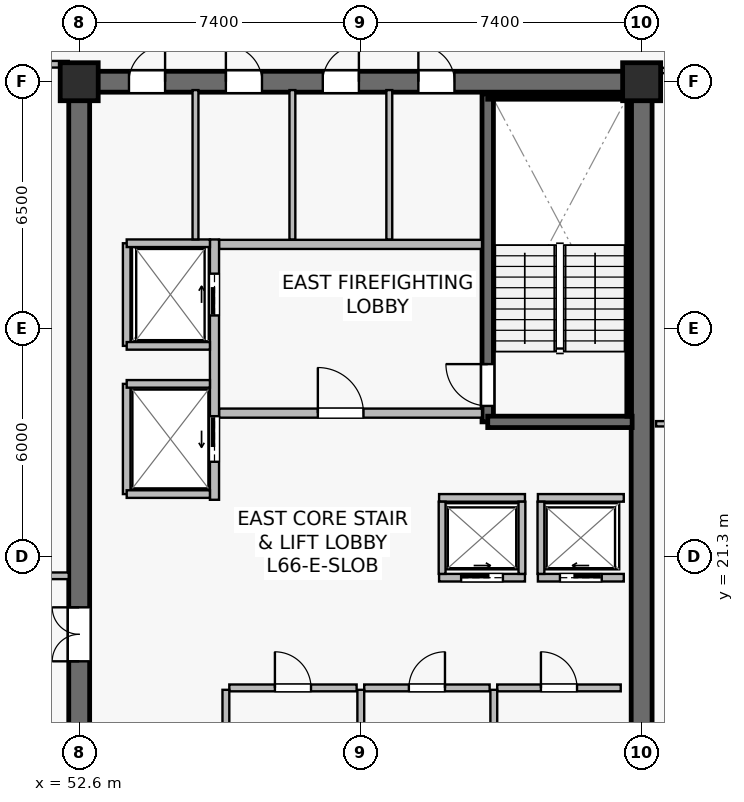
"""IFC4 building model, lengths in metres.
Left out: names, types, materials, properties, quantities, classifications, styles, units other than length and angle.
Written with IfcOpenShell. Run it as: python <this file> out.ifc"""

import sys

from ifc_helpers import new_model, si_unit, direction, frame, frame_2d, origin, origin_2d, place, context, subcontext, project, spatial, rectangle, extrude, source, transform, mapped, element, fill, save


model = new_model("IFC4")
c1 = context("Model", 3, precision=1e-05, world=origin(), true_north=direction((0.0, 1.0)))
c2 = subcontext(c1, "Body", "Model", "MODEL_VIEW")
j1 = project(units=[si_unit("LENGTHUNIT", "METRE"), si_unit("PLANEANGLEUNIT", "RADIAN")], contexts=[c1])
p1 = place(None, origin())
s1 = spatial("IfcSite", under=j1, at=p1, CompositionType="ELEMENT")
p2 = place(p1, origin())
s2 = spatial("IfcBuilding", under=s1, at=p2, CompositionType="ELEMENT")
p3 = place(p2, frame((0.0, 0.0, 275.2)))
s3 = spatial("IfcBuildingStorey", under=s2, at=p3, CompositionType="ELEMENT", Elevation=275.2)
p4 = place(p3, frame((52.325, 33.8, 0.0), z_axis=(0.0, 0.0, 1.0), x_axis=(1.0, 0.0, 0.0)))
e1 = element("IfcWall", 1, at=p4, inside=s3, PredefinedType="SHEAR", context=c2, shape_type="SweptSolid", body=[
    extrude(rectangle(XDim=15.35, YDim=0.55, at=frame_2d((7.675, 0.0))), origin(), (0.0, 0.0, 1.0), 3.8),
])
p5 = place(p4, frame((9.2, 0.0, 0.0)))
e2 = element("IfcOpeningElement", 2, at=p5, cuts=e1, PredefinedType="OPENING", context=c2, shape_type="SweptSolid", body=[
    extrude(rectangle(XDim=0.95, YDim=2.15, at=frame_2d((0.475, 1.075))), frame((0.0, 0.285, 0.0), z_axis=(0.0, -1.0, 0.0), x_axis=(1.0, 0.0, 0.0)), (0.0, 0.0, 1.0), 0.57),
])
p6 = place(p4, frame((6.685, 0.0, 0.0)))
e3 = element("IfcOpeningElement", 3, at=p6, cuts=e1, PredefinedType="OPENING", context=c2, shape_type="SweptSolid", body=[
    extrude(rectangle(XDim=0.95, YDim=2.15, at=frame_2d((0.475, 1.075))), frame((0.0, 0.285, 0.0), z_axis=(0.0, -1.0, 0.0), x_axis=(1.0, 0.0, 0.0)), (0.0, 0.0, 1.0), 0.57),
])
p7 = place(p4, frame((4.135, 0.0, 0.0)))
e4 = element("IfcOpeningElement", 4, at=p7, cuts=e1, PredefinedType="OPENING", context=c2, shape_type="SweptSolid", body=[
    extrude(rectangle(XDim=0.95, YDim=2.15, at=frame_2d((0.475, 1.075))), frame((0.0, 0.285, 0.0), z_axis=(0.0, -1.0, 0.0), x_axis=(1.0, 0.0, 0.0)), (0.0, 0.0, 1.0), 0.57),
])
p8 = place(p4, frame((1.585, 0.0, 0.0)))
e5 = element("IfcOpeningElement", 5, at=p8, cuts=e1, PredefinedType="OPENING", context=c2, shape_type="SweptSolid", body=[
    extrude(rectangle(XDim=0.95, YDim=2.15, at=frame_2d((0.475, 1.075))), frame((0.0, 0.285, 0.0), z_axis=(0.0, -1.0, 0.0), x_axis=(1.0, 0.0, 0.0)), (0.0, 0.0, 1.0), 0.57),
])
p9 = place(p3, frame((52.6, 15.075, 0.0), z_axis=(0.0, 0.0, 1.0), x_axis=(0.0, 1.0, 0.0)))
e6 = element("IfcWall", 6, at=p9, inside=s3, PredefinedType="SHEAR", context=c2, shape_type="SweptSolid", body=[
    extrude(rectangle(XDim=18.45, YDim=0.55, at=frame_2d((9.225, 0.0))), origin(), (0.0, 0.0, 1.0), 3.8),
])
p10 = place(p9, frame((3.475, 0.0, 0.0)))
e7 = element("IfcOpeningElement", 7, at=p10, cuts=e6, PredefinedType="OPENING", context=c2, shape_type="SweptSolid", body=[
    extrude(rectangle(XDim=1.42, YDim=2.2, at=frame_2d((0.71, 1.1))), frame((0.0, 0.285, 0.0), z_axis=(0.0, -1.0, 0.0), x_axis=(1.0, 0.0, 0.0)), (0.0, 0.0, 1.0), 0.57),
])
p11 = place(p3, frame((67.4, 15.075, 0.0), z_axis=(0.0, 0.0, 1.0), x_axis=(0.0, 1.0, 0.0)))
e8 = element("IfcWall", 8, at=p11, inside=s3, PredefinedType="SHEAR", context=c2, shape_type="SweptSolid", body=[
    extrude(rectangle(XDim=18.45, YDim=0.55, at=frame_2d((9.225, 0.0))), origin(), (0.0, 0.0, 1.0), 3.8),
])
p12 = place(p3, frame((63.35, 24.85, 0.0), z_axis=(0.0, 0.0, 1.0), x_axis=(0.0, 1.0, 0.0)))
e9 = element("IfcWall", 9, at=p12, inside=s3, PredefinedType="SHEAR", context=c2, shape_type="SweptSolid", body=[
    extrude(rectangle(XDim=8.63, YDim=0.3, at=frame_2d((4.315, 0.0))), origin(), (0.0, 0.0, 1.0), 3.8),
])
p13 = place(p12, frame((0.42, 0.0, 0.0)))
e10 = element("IfcOpeningElement", 10, at=p13, cuts=e9, PredefinedType="OPENING", context=c2, shape_type="SweptSolid", body=[
    extrude(rectangle(XDim=1.1, YDim=2.15, at=frame_2d((0.55, 1.075))), frame((0.0, 0.16, 0.0), z_axis=(0.0, -1.0, 0.0), x_axis=(1.0, 0.0, 0.0)), (0.0, 0.0, 1.0), 0.32),
])
p14 = place(p3, frame((63.35, 24.85, 0.0), z_axis=(0.0, 0.0, 1.0), x_axis=(1.0, 0.0, 0.0)))
e11 = element("IfcWall", 11, at=p14, inside=s3, PredefinedType="SHEAR", context=c2, shape_type="SweptSolid", body=[
    extrude(rectangle(XDim=3.8, YDim=0.3, at=frame_2d((1.9, 0.0))), origin(), (0.0, 0.0, 1.0), 3.8),
])
p15 = place(p3, frame((63.35, 33.4, 0.0), z_axis=(0.0, 0.0, 1.0), x_axis=(1.0, 0.0, 0.0)))
e12 = element("IfcWall", 12, at=p15, inside=s3, PredefinedType="SOLIDWALL", context=c2, shape_type="SweptSolid", body=[
    extrude(rectangle(XDim=3.72, YDim=0.12, at=frame_2d((1.86, 0.0))), origin(), (0.0, 0.0, 1.0), 3.8),
])
p16 = place(p3, frame((67.07, 25.0, 0.0), z_axis=(0.0, 0.0, 1.0), x_axis=(0.0, 1.0, 0.0)))
e13 = element("IfcWall", 13, at=p16, inside=s3, PredefinedType="SOLIDWALL", context=c2, shape_type="SweptSolid", body=[
    extrude(rectangle(XDim=8.32, YDim=0.12, at=frame_2d((4.16, 0.0))), origin(), (0.0, 0.0, 1.0), 3.8),
])
m1 = source(origin(), c2, "Body", "SweptSolid", [
    extrude(rectangle(XDim=1.0, YDim=1.0, at=origin_2d()), origin(), (0.0, 0.0, 1.0), 4.1),
])
for number, where, z_axis, x_axis in (
    (14, (52.6, 33.8, 0.0), (0.0, 0.0, 1.0), (1.0, 0.0, 0.0)),
    (15, (67.4, 33.8, 0.0), (0.0, 0.0, 1.0), (1.0, 0.0, 0.0)),
):
    element("IfcColumn", number, at=place(p3, frame(where, z_axis=z_axis, x_axis=x_axis)), inside=s3, PredefinedType="COLUMN", context=c2, shape_type="MappedRepresentation", body=[
        mapped(m1, transform((0.0, 0.0, 0.0), scale=1.0)),
    ])
p17 = place(p3, frame((56.28, 25.08, 0.0), z_axis=(0.0, 0.0, 1.0), x_axis=(1.0, 0.0, 0.0)))
e16 = element("IfcWall", 16, at=p17, inside=s3, PredefinedType="SOLIDWALL", context=c2, shape_type="SweptSolid", body=[
    extrude(rectangle(XDim=6.92, YDim=0.24, at=frame_2d((3.46, 0.0))), origin(), (0.0, 0.0, 1.0), 3.197),
])
p18 = place(p17, frame((2.6, 0.0, 0.0)))
e17 = element("IfcOpeningElement", 17, at=p18, cuts=e16, PredefinedType="OPENING", context=c2, shape_type="SweptSolid", body=[
    extrude(rectangle(XDim=1.2, YDim=2.16, at=frame_2d((0.6, 1.08))), frame((0.0, 0.13, 0.0), z_axis=(0.0, -1.0, 0.0), x_axis=(1.0, 0.0, 0.0)), (0.0, 0.0, 1.0), 0.26),
])
p19 = place(p3, frame((56.28, 29.52, 0.0), z_axis=(0.0, 0.0, 1.0), x_axis=(1.0, 0.0, 0.0)))
e18 = element("IfcWall", 18, at=p19, inside=s3, PredefinedType="SOLIDWALL", context=c2, shape_type="SweptSolid", body=[
    extrude(rectangle(XDim=6.92, YDim=0.24, at=frame_2d((3.46, 0.0))), origin(), (0.0, 0.0, 1.0), 3.197),
])
p20 = place(p3, frame((56.16, 22.8, 0.0), z_axis=(0.0, 0.0, 1.0), x_axis=(0.0, 1.0, 0.0)))
e19 = element("IfcWall", 19, at=p20, inside=s3, PredefinedType="SOLIDWALL", context=c2, shape_type="SweptSolid", body=[
    extrude(rectangle(XDim=6.85, YDim=0.24, at=frame_2d((3.425, 0.0))), origin(), (0.0, 0.0, 1.0), 2.935),
])
p21 = place(p20, frame((4.85, 0.0, 0.0)))
e20 = element("IfcOpeningElement", 20, at=p21, cuts=e19, PredefinedType="OPENING", context=c2, shape_type="SweptSolid", body=[
    extrude(rectangle(XDim=1.1, YDim=2.22, at=frame_2d((0.55, 1.11))), frame((0.0, 0.13, 0.0), z_axis=(0.0, -1.0, 0.0), x_axis=(1.0, 0.0, 0.0)), (0.0, 0.0, 1.0), 0.26),
])
p22 = place(p20, frame((1.0, 0.0, 0.0)))
e21 = element("IfcOpeningElement", 21, at=p22, cuts=e19, PredefinedType="OPENING", context=c2, shape_type="SweptSolid", body=[
    extrude(rectangle(XDim=1.2, YDim=2.22, at=frame_2d((0.6, 1.11))), frame((0.0, 0.13, 0.0), z_axis=(0.0, -1.0, 0.0), x_axis=(1.0, 0.0, 0.0)), (0.0, 0.0, 1.0), 0.26),
])
p23 = place(p3, frame((64.67, 20.75, 0.0), z_axis=(0.0, 0.0, 1.0), x_axis=(1.0, 0.0, 0.0)))
e22 = element("IfcWall", 22, at=p23, inside=s3, PredefinedType="SOLIDWALL", context=c2, shape_type="SweptSolid", body=[
    extrude(rectangle(XDim=2.26, YDim=0.2, at=frame_2d((1.13, 0.0))), origin(), (0.0, 0.0, 1.0), 3.8),
])
p24 = place(p23, frame((0.58, 0.0, 0.0)))
e23 = element("IfcOpeningElement", 23, at=p24, cuts=e22, PredefinedType="OPENING", context=c2, shape_type="SweptSolid", body=[
    extrude(rectangle(XDim=1.1, YDim=2.22, at=frame_2d((0.55, 1.11))), frame((0.0, 0.11, 0.0), z_axis=(0.0, -1.0, 0.0), x_axis=(1.0, 0.0, 0.0)), (0.0, 0.0, 1.0), 0.22),
])
p25 = place(p3, frame((64.67, 22.85, 0.0), z_axis=(0.0, 0.0, 1.0), x_axis=(1.0, 0.0, 0.0)))
e24 = element("IfcWall", 24, at=p25, inside=s3, PredefinedType="SOLIDWALL", context=c2, shape_type="SweptSolid", body=[
    extrude(rectangle(XDim=2.26, YDim=0.2, at=frame_2d((1.13, 0.0))), origin(), (0.0, 0.0, 1.0), 3.8),
])
p26 = place(p3, frame((64.75, 20.85, 0.0), z_axis=(0.0, 0.0, 1.0), x_axis=(0.0, 1.0, 0.0)))
e25 = element("IfcWall", 25, at=p26, inside=s3, PredefinedType="SOLIDWALL", context=c2, shape_type="SweptSolid", body=[
    extrude(rectangle(XDim=1.9, YDim=0.18, at=frame_2d((0.95, 0.0))), origin(), (0.0, 0.0, 1.0), 3.8),
])
p27 = place(p3, frame((62.07, 20.75, 0.0), z_axis=(0.0, 0.0, 1.0), x_axis=(1.0, 0.0, 0.0)))
e26 = element("IfcWall", 26, at=p27, inside=s3, PredefinedType="SOLIDWALL", context=c2, shape_type="SweptSolid", body=[
    extrude(rectangle(XDim=2.26, YDim=0.2, at=frame_2d((1.13, 0.0))), origin(), (0.0, 0.0, 1.0), 3.8),
])
p28 = place(p27, frame((0.58, 0.0, 0.0)))
e27 = element("IfcOpeningElement", 27, at=p28, cuts=e26, PredefinedType="OPENING", context=c2, shape_type="SweptSolid", body=[
    extrude(rectangle(XDim=1.1, YDim=2.22, at=frame_2d((0.55, 1.11))), frame((0.0, 0.11, 0.0), z_axis=(0.0, -1.0, 0.0), x_axis=(1.0, 0.0, 0.0)), (0.0, 0.0, 1.0), 0.22),
])
p29 = place(p3, frame((62.07, 22.85, 0.0), z_axis=(0.0, 0.0, 1.0), x_axis=(1.0, 0.0, 0.0)))
e28 = element("IfcWall", 28, at=p29, inside=s3, PredefinedType="SOLIDWALL", context=c2, shape_type="SweptSolid", body=[
    extrude(rectangle(XDim=2.26, YDim=0.2, at=frame_2d((1.13, 0.0))), origin(), (0.0, 0.0, 1.0), 3.8),
])
for number, where, z_axis, x_axis in (
    (29, (62.15, 20.85, 0.0), (0.0, 0.0, 1.0), (0.0, 1.0, 0.0)),
    (30, (64.25, 20.85, 0.0), (0.0, 0.0, 1.0), (0.0, 1.0, 0.0)),
):
    element("IfcWall", number, at=place(p3, frame(where, z_axis=z_axis, x_axis=x_axis)), inside=s3, PredefinedType="SOLIDWALL", context=c2, shape_type="SweptSolid", body=[
        extrude(rectangle(XDim=1.9, YDim=0.18, at=frame_2d((0.95, 0.0))), origin(), (0.0, 0.0, 1.0), 3.8),
    ])
p30 = place(p3, frame((53.85, 26.85, 0.0), z_axis=(0.0, 0.0, 1.0), x_axis=(0.0, 1.0, 0.0)))
e31 = element("IfcWall", 31, at=p30, inside=s3, PredefinedType="SOLIDWALL", context=c2, shape_type="SweptSolid", body=[
    extrude(rectangle(XDim=2.7, YDim=0.2, at=frame_2d((1.35, 0.0))), origin(), (0.0, 0.0, 1.0), 3.8),
])
p31 = place(p3, frame((53.85, 29.55, 0.0), z_axis=(0.0, 0.0, 1.0), x_axis=(1.0, 0.0, 0.0)))
e32 = element("IfcWall", 32, at=p31, inside=s3, PredefinedType="SOLIDWALL", context=c2, shape_type="SweptSolid", body=[
    extrude(rectangle(XDim=2.19, YDim=0.2, at=frame_2d((1.095, 0.0))), origin(), (0.0, 0.0, 1.0), 3.8),
])
p32 = place(p3, frame((53.85, 26.85, 0.0), z_axis=(0.0, 0.0, 1.0), x_axis=(1.0, 0.0, 0.0)))
e33 = element("IfcWall", 33, at=p32, inside=s3, PredefinedType="SOLIDWALL", context=c2, shape_type="SweptSolid", body=[
    extrude(rectangle(XDim=2.19, YDim=0.2, at=frame_2d((1.095, 0.0))), origin(), (0.0, 0.0, 1.0), 3.197),
])
p33 = place(p3, frame((53.85, 22.95, 0.0), z_axis=(0.0, 0.0, 1.0), x_axis=(0.0, 1.0, 0.0)))
e34 = element("IfcWall", 34, at=p33, inside=s3, PredefinedType="SOLIDWALL", context=c2, shape_type="SweptSolid", body=[
    extrude(rectangle(XDim=2.9, YDim=0.2, at=frame_2d((1.45, 0.0))), origin(), (0.0, 0.0, 1.0), 2.935),
])
for number, where, z_axis, x_axis in (
    (35, (53.85, 25.85, 0.0), (0.0, 0.0, 1.0), (1.0, 0.0, 0.0)),
    (36, (53.85, 22.95, 0.0), (0.0, 0.0, 1.0), (1.0, 0.0, 0.0)),
):
    element("IfcWall", number, at=place(p3, frame(where, z_axis=z_axis, x_axis=x_axis)), inside=s3, PredefinedType="SOLIDWALL", context=c2, shape_type="SweptSolid", body=[
        extrude(rectangle(XDim=2.19, YDim=0.2, at=frame_2d((1.095, 0.0))), origin(), (0.0, 0.0, 1.0), 3.8),
    ])
p34 = place(p3, frame((63.6, 17.85, 0.0), z_axis=(0.0, 0.0, 1.0), x_axis=(1.0, 0.0, 0.0)))
e37 = element("IfcWall", 37, at=p34, inside=s3, PredefinedType="SOLIDWALL", context=c2, shape_type="SweptSolid", body=[
    extrude(rectangle(XDim=3.25, YDim=0.18, at=frame_2d((1.625, 0.0))), origin(), (0.0, 0.0, 1.0), 3.8),
])
p35 = place(p34, frame((1.15, 0.0, 0.0)))
e38 = element("IfcOpeningElement", 38, at=p35, cuts=e37, PredefinedType="OPENING", context=c2, shape_type="SweptSolid", body=[
    extrude(rectangle(XDim=0.95, YDim=2.15, at=frame_2d((0.475, 1.075))), frame((0.0, 0.1, 0.0), z_axis=(0.0, -1.0, 0.0), x_axis=(1.0, 0.0, 0.0)), (0.0, 0.0, 1.0), 0.2),
])
p36 = place(p3, frame((63.51, 15.4, 0.0), z_axis=(0.0, 0.0, 1.0), x_axis=(0.0, 1.0, 0.0)))
e39 = element("IfcWall", 39, at=p36, inside=s3, PredefinedType="SOLIDWALL", context=c2, shape_type="SweptSolid", body=[
    extrude(rectangle(XDim=2.4, YDim=0.18, at=frame_2d((1.2, 0.0))), origin(), (0.0, 0.0, 1.0), 3.8),
])
p37 = place(p3, frame((60.1, 17.85, 0.0), z_axis=(0.0, 0.0, 1.0), x_axis=(1.0, 0.0, 0.0)))
e40 = element("IfcWall", 40, at=p37, inside=s3, PredefinedType="SOLIDWALL", context=c2, shape_type="SweptSolid", body=[
    extrude(rectangle(XDim=3.3, YDim=0.18, at=frame_2d((1.65, 0.0))), origin(), (0.0, 0.0, 1.0), 3.197),
])
p38 = place(p37, frame((1.175, 0.0, 0.0)))
e41 = element("IfcOpeningElement", 41, at=p38, cuts=e40, PredefinedType="OPENING", context=c2, shape_type="SweptSolid", body=[
    extrude(rectangle(XDim=0.95, YDim=2.15, at=frame_2d((0.475, 1.075))), frame((0.0, 0.1, 0.0), z_axis=(0.0, -1.0, 0.0), x_axis=(1.0, 0.0, 0.0)), (0.0, 0.0, 1.0), 0.2),
])
p39 = place(p3, frame((60.01, 15.4, 0.0), z_axis=(0.0, 0.0, 1.0), x_axis=(0.0, 1.0, 0.0)))
e42 = element("IfcWall", 42, at=p39, inside=s3, PredefinedType="SOLIDWALL", context=c2, shape_type="SweptSolid", body=[
    extrude(rectangle(XDim=2.4, YDim=0.18, at=frame_2d((1.2, 0.0))), origin(), (0.0, 0.0, 1.0), 3.197),
])
p40 = place(p3, frame((56.55, 17.85, 0.0), z_axis=(0.0, 0.0, 1.0), x_axis=(1.0, 0.0, 0.0)))
e43 = element("IfcWall", 43, at=p40, inside=s3, PredefinedType="SOLIDWALL", context=c2, shape_type="SweptSolid", body=[
    extrude(rectangle(XDim=3.35, YDim=0.18, at=frame_2d((1.675, 0.0))), origin(), (0.0, 0.0, 1.0), 3.197),
])
p41 = place(p40, frame((1.2, 0.0, 0.0)))
e44 = element("IfcOpeningElement", 44, at=p41, cuts=e43, PredefinedType="OPENING", context=c2, shape_type="SweptSolid", body=[
    extrude(rectangle(XDim=0.95, YDim=2.15, at=frame_2d((0.475, 1.075))), frame((0.0, 0.1, 0.0), z_axis=(0.0, -1.0, 0.0), x_axis=(1.0, 0.0, 0.0)), (0.0, 0.0, 1.0), 0.2),
])
p42 = place(p3, frame((56.46, 15.4, 0.0), z_axis=(0.0, 0.0, 1.0), x_axis=(0.0, 1.0, 0.0)))
e45 = element("IfcWall", 45, at=p42, inside=s3, PredefinedType="SOLIDWALL", context=c2, shape_type="SweptSolid", body=[
    extrude(rectangle(XDim=2.4, YDim=0.18, at=frame_2d((1.2, 0.0))), origin(), (0.0, 0.0, 1.0), 3.8),
])
for number, where, z_axis, x_axis in (
    (46, (60.76, 29.65, 0.0), (0.0, 0.0, 1.0), (0.0, 1.0, 0.0)),
    (47, (58.21, 29.65, 0.0), (0.0, 0.0, 1.0), (0.0, 1.0, 0.0)),
    (48, (55.66, 29.65, 0.0), (0.0, 0.0, 1.0), (0.0, 1.0, 0.0)),
):
    element("IfcWall", number, at=place(p3, frame(where, z_axis=z_axis, x_axis=x_axis)), inside=s3, PredefinedType="PLUMBINGWALL", context=c2, shape_type="SweptSolid", body=[
        extrude(rectangle(XDim=3.93, YDim=0.155, at=frame_2d((1.965, 0.0))), origin(), (0.0, 0.0, 1.0), 3.8),
    ])
p43 = place(p3, frame((48.3, 34.26, 0.0), z_axis=(0.0, 0.0, 1.0), x_axis=(1.0, 0.0, 0.0)))
e49 = element("IfcWall", 49, at=p43, inside=s3, PredefinedType="PARTITIONING", context=c2, shape_type="SweptSolid", body=[
    extrude(rectangle(XDim=4.025, YDim=0.175, at=frame_2d((2.012, 0.0))), origin(), (0.0, 0.0, 1.0), 3.535),
])
p44 = place(p3, frame((48.3, 20.8, 0.0), z_axis=(0.0, 0.0, 1.0), x_axis=(1.0, 0.0, 0.0)))
e50 = element("IfcWall", 50, at=p44, inside=s3, PredefinedType="PARTITIONING", context=c2, shape_type="SweptSolid", body=[
    extrude(rectangle(XDim=4.025, YDim=0.175, at=frame_2d((2.012, 0.0))), origin(), (0.0, 0.0, 1.0), 3.8),
])
p45 = place(p44, frame((1.35, 0.0, 0.0)))
e51 = element("IfcOpeningElement", 51, at=p45, cuts=e50, PredefinedType="OPENING", context=c2, shape_type="SweptSolid", body=[
    extrude(rectangle(XDim=0.95, YDim=2.15, at=frame_2d((0.475, 1.075))), frame((0.0, 0.098, 0.0), z_axis=(0.0, -1.0, 0.0), x_axis=(1.0, 0.0, 0.0)), (0.0, 0.0, 1.0), 0.195),
])
p46 = place(p3, frame((67.78, 24.8, 0.0), z_axis=(0.0, 0.0, 1.0), x_axis=(1.0, 0.0, 0.0)))
e52 = element("IfcWall", 52, at=p46, inside=s3, PredefinedType="PARTITIONING", context=c2, shape_type="SweptSolid", body=[
    extrude(rectangle(XDim=2.91, YDim=0.14, at=frame_2d((1.455, 0.0))), origin(), (0.0, 0.0, 1.0), 3.8),
])
p47 = place(p3, frame((67.78, 34.095, 0.0), z_axis=(0.0, 0.0, 1.0), x_axis=(1.0, 0.0, 0.0)))
e53 = element("IfcWall", 53, at=p47, inside=s3, PredefinedType="PARTITIONING", context=c2, shape_type="SweptSolid", body=[
    extrude(rectangle(XDim=2.91, YDim=0.14, at=frame_2d((1.455, 0.0))), origin(), (0.0, 0.0, 1.0), 3.8),
])
p48 = place(p47, frame((1.005, 0.0, 0.0)))
e54 = element("IfcOpeningElement", 54, at=p48, cuts=e53, PredefinedType="OPENING", context=c2, shape_type="SweptSolid", body=[
    extrude(rectangle(XDim=0.9, YDim=2.1, at=frame_2d((0.45, 1.05))), frame((0.0, 0.08, 0.0), z_axis=(0.0, -1.0, 0.0), x_axis=(1.0, 0.0, 0.0)), (0.0, 0.0, 1.0), 0.16),
])
m2 = source(origin(), c2, "Body", "SweptSolid", [
    extrude(rectangle(XDim=1.1, YDim=2.15, at=frame_2d((0.55, 1.075))), frame((0.0, 0.025, 0.0), z_axis=(0.0, -1.0, 0.0), x_axis=(1.0, 0.0, 0.0)), (0.0, 0.0, 1.0), 0.05),
])
p49 = place(p13, origin())
e55 = element("IfcDoor", 55, at=p49, inside=s3, OperationType="SINGLE_SWING_RIGHT", PredefinedType="DOOR", context=c2, shape_type="MappedRepresentation", body=[
    mapped(m2, transform((0.0, 0.0, 0.0), scale=1.0)),
])
fill(e10, e55)
m3 = source(origin(), c2, "Body", "SweptSolid", [
    extrude(rectangle(XDim=1.2, YDim=2.16, at=frame_2d((0.6, 1.08))), frame((0.0, 0.025, 0.0), z_axis=(0.0, -1.0, 0.0), x_axis=(1.0, 0.0, 0.0)), (0.0, 0.0, 1.0), 0.05),
])
p50 = place(p18, origin())
e56 = element("IfcDoor", 56, at=p50, inside=s3, OperationType="SINGLE_SWING_LEFT", PredefinedType="DOOR", context=c2, shape_type="MappedRepresentation", body=[
    mapped(m3, transform((0.0, 0.0, 0.0), scale=1.0)),
])
fill(e17, e56)
m4 = source(origin(), c2, "Body", "SweptSolid", [
    extrude(rectangle(XDim=1.1, YDim=2.22, at=frame_2d((0.55, 1.11))), frame((0.0, 0.025, 0.0), z_axis=(0.0, -1.0, 0.0), x_axis=(1.0, 0.0, 0.0)), (0.0, 0.0, 1.0), 0.05),
])
p51 = place(p24, origin())
e57 = element("IfcDoor", 57, at=p51, inside=s3, OperationType="SLIDING_TO_LEFT", PredefinedType="USERDEFINED", context=c2, shape_type="MappedRepresentation", body=[
    mapped(m4, transform((0.0, 0.0, 0.0), scale=1.0)),
])
fill(e23, e57)
p52 = place(p28, origin())
e58 = element("IfcDoor", 58, at=p52, inside=s3, OperationType="SLIDING_TO_RIGHT", PredefinedType="USERDEFINED", context=c2, shape_type="MappedRepresentation", body=[
    mapped(m4, transform((0.0, 0.0, 0.0), scale=1.0)),
])
fill(e27, e58)
p53 = place(p21, origin())
e59 = element("IfcDoor", 59, at=p53, inside=s3, OperationType="SLIDING_TO_RIGHT", PredefinedType="USERDEFINED", context=c2, shape_type="MappedRepresentation", body=[
    mapped(m4, transform((0.0, 0.0, 0.0), scale=1.0)),
])
fill(e20, e59)
m5 = source(origin(), c2, "Body", "SweptSolid", [
    extrude(rectangle(XDim=1.2, YDim=2.22, at=frame_2d((0.6, 1.11))), frame((0.0, 0.025, 0.0), z_axis=(0.0, -1.0, 0.0), x_axis=(1.0, 0.0, 0.0)), (0.0, 0.0, 1.0), 0.05),
])
p54 = place(p22, origin())
e60 = element("IfcDoor", 60, at=p54, inside=s3, OperationType="SLIDING_TO_LEFT", PredefinedType="USERDEFINED", context=c2, shape_type="MappedRepresentation", body=[
    mapped(m5, transform((0.0, 0.0, 0.0), scale=1.0)),
])
fill(e21, e60)
m6 = source(origin(), c2, "Body", "SweptSolid", [
    extrude(rectangle(XDim=0.95, YDim=2.15, at=frame_2d((0.475, 1.075))), frame((0.0, 0.025, 0.0), z_axis=(0.0, -1.0, 0.0), x_axis=(1.0, 0.0, 0.0)), (0.0, 0.0, 1.0), 0.05),
])
p55 = place(p35, origin())
e61 = element("IfcDoor", 61, at=p55, inside=s3, OperationType="SINGLE_SWING_LEFT", PredefinedType="DOOR", context=c2, shape_type="MappedRepresentation", body=[
    mapped(m6, transform((0.0, 0.0, 0.0), scale=1.0)),
])
fill(e38, e61)
p56 = place(p38, origin())
e62 = element("IfcDoor", 62, at=p56, inside=s3, OperationType="SINGLE_SWING_RIGHT", PredefinedType="DOOR", context=c2, shape_type="MappedRepresentation", body=[
    mapped(m6, transform((0.0, 0.0, 0.0), scale=1.0)),
])
fill(e41, e62)
p57 = place(p41, origin())
e63 = element("IfcDoor", 63, at=p57, inside=s3, OperationType="SINGLE_SWING_LEFT", PredefinedType="DOOR", context=c2, shape_type="MappedRepresentation", body=[
    mapped(m6, transform((0.0, 0.0, 0.0), scale=1.0)),
])
fill(e44, e63)
m7 = source(origin(), c2, "Body", "SweptSolid", [
    extrude(rectangle(XDim=1.42, YDim=2.2, at=frame_2d((0.71, 1.1))), frame((0.0, 0.025, 0.0), z_axis=(0.0, -1.0, 0.0), x_axis=(1.0, 0.0, 0.0)), (0.0, 0.0, 1.0), 0.05),
])
p58 = place(p10, origin())
e64 = element("IfcDoor", 64, at=p58, inside=s3, OperationType="DOUBLE_DOOR_SINGLE_SWING", PredefinedType="DOOR", context=c2, shape_type="MappedRepresentation", body=[
    mapped(m7, transform((0.0, 0.0, 0.0), scale=1.0)),
])
fill(e7, e64)
p59 = place(p5, origin())
e65 = element("IfcDoor", 65, at=p59, inside=s3, OperationType="SINGLE_SWING_LEFT", PredefinedType="DOOR", context=c2, shape_type="MappedRepresentation", body=[
    mapped(m6, transform((0.0, 0.0, 0.0), scale=1.0)),
])
fill(e2, e65)
p60 = place(p6, origin())
e66 = element("IfcDoor", 66, at=p60, inside=s3, OperationType="SINGLE_SWING_RIGHT", PredefinedType="DOOR", context=c2, shape_type="MappedRepresentation", body=[
    mapped(m6, transform((0.0, 0.0, 0.0), scale=1.0)),
])
fill(e3, e66)
p61 = place(p7, origin())
e67 = element("IfcDoor", 67, at=p61, inside=s3, OperationType="SINGLE_SWING_LEFT", PredefinedType="DOOR", context=c2, shape_type="MappedRepresentation", body=[
    mapped(m6, transform((0.0, 0.0, 0.0), scale=1.0)),
])
fill(e4, e67)
p62 = place(p8, origin())
e68 = element("IfcDoor", 68, at=p62, inside=s3, OperationType="SINGLE_SWING_RIGHT", PredefinedType="DOOR", context=c2, shape_type="MappedRepresentation", body=[
    mapped(m6, transform((0.0, 0.0, 0.0), scale=1.0)),
])
fill(e5, e68)
save(model, sys.argv[1])
